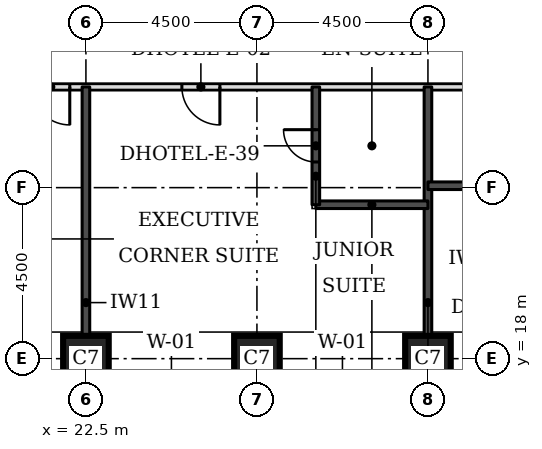
"""IFC4 building model, lengths in metres.
Left out: names, types, materials, properties, quantities, classifications, styles, units other than length and angle.
Written with IfcOpenShell. Run it as: python <this file> out.ifc"""

import sys

from ifc_helpers import new_model, si_unit, direction, frame, frame_2d, origin, origin_2d, place, context, subcontext, project, spatial, rectangle, extrude, element, fill, save


model = new_model("IFC4")
c1 = context("Model", 3, precision=1e-05, world=origin(), true_north=direction((0.0, 1.0)))
c2 = subcontext(c1, "Body", "Model", "MODEL_VIEW")
j1 = project(units=[si_unit("LENGTHUNIT", "METRE"), si_unit("PLANEANGLEUNIT", "RADIAN")], contexts=[c1])
p1 = place(None, origin())
s1 = spatial("IfcSite", under=j1, at=p1, CompositionType="ELEMENT")
p2 = place(p1, origin())
s2 = spatial("IfcBuilding", under=s1, at=p2, CompositionType="ELEMENT")
p3 = place(p2, frame((0.0, 0.0, 39.6)))
s3 = spatial("IfcBuildingStorey", under=s2, at=p3, CompositionType="ELEMENT", Elevation=39.6)
for number, where, z_axis, x_axis in (
    (1, (22.5, 18.0, 0.0), (0.0, 0.0, 1.0), (1.0, 0.0, 0.0)),
    (2, (27.0, 18.0, 0.0), (0.0, 0.0, 1.0), (1.0, 0.0, 0.0)),
    (3, (31.5, 18.0, 0.0), (0.0, 0.0, 1.0), (1.0, 0.0, 0.0)),
):
    element("IfcColumn", number, at=place(p3, frame(where, z_axis=z_axis, x_axis=x_axis)), inside=s3, PredefinedType="COLUMN", context=c2, shape_type="SweptSolid", body=[
        extrude(rectangle(XDim=1.2, YDim=1.2, at=origin_2d()), origin(), (0.0, 0.0, 1.0), 3.3),
    ])
p4 = place(p3, frame((20.65, 25.15, 0.0), z_axis=(0.0, 0.0, 1.0), x_axis=(1.0, 0.0, 0.0)))
e4 = element("IfcWall", 4, at=p4, inside=s3, PredefinedType="PARTITIONING", context=c2, shape_type="SweptSolid", body=[
    extrude(rectangle(XDim=32.2, YDim=0.15, at=frame_2d((16.1, 0.0))), origin(), (0.0, 0.0, 1.0), 3.08),
])
p5 = place(p4, frame((4.375, 0.0, 0.0)))
e5 = element("IfcOpeningElement", 5, at=p5, cuts=e4, PredefinedType="OPENING", context=c2, shape_type="SweptSolid", body=[
    extrude(rectangle(XDim=1.0, YDim=2.1, at=frame_2d((0.5, 1.05))), frame((0.0, 0.085, 0.0), z_axis=(0.0, -1.0, 0.0), x_axis=(1.0, 0.0, 0.0)), (0.0, 0.0, 1.0), 0.17),
])
p6 = place(p4, frame((16.075, 0.0, 0.0)))
e6 = element("IfcOpeningElement", 6, at=p6, cuts=e4, PredefinedType="OPENING", context=c2, shape_type="SweptSolid", body=[
    extrude(rectangle(XDim=1.0, YDim=2.1, at=frame_2d((0.5, 1.05))), frame((0.0, 0.085, 0.0), z_axis=(0.0, -1.0, 0.0), x_axis=(1.0, 0.0, 0.0)), (0.0, 0.0, 1.0), 0.17),
])
p7 = place(p4, frame((22.375, 0.0, 0.0)))
e7 = element("IfcOpeningElement", 7, at=p7, cuts=e4, PredefinedType="OPENING", context=c2, shape_type="SweptSolid", body=[
    extrude(rectangle(XDim=1.0, YDim=2.1, at=frame_2d((0.5, 1.05))), frame((0.0, 0.085, 0.0), z_axis=(0.0, -1.0, 0.0), x_axis=(1.0, 0.0, 0.0)), (0.0, 0.0, 1.0), 0.17),
])
p8 = place(p4, frame((0.425, 0.0, 0.0)))
e8 = element("IfcOpeningElement", 8, at=p8, cuts=e4, PredefinedType="OPENING", context=c2, shape_type="SweptSolid", body=[
    extrude(rectangle(XDim=1.0, YDim=2.1, at=frame_2d((0.5, 1.05))), frame((0.0, 0.085, 0.0), z_axis=(0.0, -1.0, 0.0), x_axis=(1.0, 0.0, 0.0)), (0.0, 0.0, 1.0), 0.17),
])
p9 = place(p4, frame((30.025, 0.0, 0.0)))
e9 = element("IfcOpeningElement", 9, at=p9, cuts=e4, PredefinedType="OPENING", context=c2, shape_type="SweptSolid", body=[
    extrude(rectangle(XDim=1.0, YDim=2.1, at=frame_2d((0.5, 1.05))), frame((0.0, 0.085, 0.0), z_axis=(0.0, -1.0, 0.0), x_axis=(1.0, 0.0, 0.0)), (0.0, 0.0, 1.0), 0.17),
])
for number, where, z_axis, x_axis in (
    (10, (22.5, 18.6, 0.0), (0.0, 0.0, 1.0), (0.0, 1.0, 0.0)),
    (11, (31.5, 18.6, 0.0), (0.0, 0.0, 1.0), (0.0, 1.0, 0.0)),
):
    element("IfcWall", number, at=place(p3, frame(where, z_axis=z_axis, x_axis=x_axis)), inside=s3, PredefinedType="SOLIDWALL", context=c2, shape_type="SweptSolid", body=[
        extrude(rectangle(XDim=6.55, YDim=0.2, at=frame_2d((3.275, 0.0))), origin(), (0.0, 0.0, 1.0), 3.08),
    ])
p10 = place(p3, frame((28.55, 22.05, 0.0), z_axis=(0.0, 0.0, 1.0), x_axis=(1.0, 0.0, 0.0)))
e12 = element("IfcWall", 12, at=p10, inside=s3, PredefinedType="SOLIDWALL", context=c2, shape_type="SweptSolid", body=[
    extrude(rectangle(XDim=2.95, YDim=0.2, at=frame_2d((1.475, 0.0))), origin(), (0.0, 0.0, 1.0), 3.08),
])
p11 = place(p3, frame((28.55, 22.05, 0.0), z_axis=(0.0, 0.0, 1.0), x_axis=(0.0, 1.0, 0.0)))
e13 = element("IfcWall", 13, at=p11, inside=s3, PredefinedType="SOLIDWALL", context=c2, shape_type="SweptSolid", body=[
    extrude(rectangle(XDim=3.1, YDim=0.2, at=frame_2d((1.55, 0.0))), origin(), (0.0, 0.0, 1.0), 3.08),
])
p12 = place(p11, frame((1.125, 0.0, 0.0)))
e14 = element("IfcOpeningElement", 14, at=p12, cuts=e13, PredefinedType="OPENING", context=c2, shape_type="SweptSolid", body=[
    extrude(rectangle(XDim=0.85, YDim=2.1, at=frame_2d((0.425, 1.05))), frame((0.0, 0.11, 0.0), z_axis=(0.0, -1.0, 0.0), x_axis=(1.0, 0.0, 0.0)), (0.0, 0.0, 1.0), 0.22),
])
p13 = place(p3, frame((31.5, 22.55, 0.0), z_axis=(0.0, 0.0, 1.0), x_axis=(1.0, 0.0, 0.0)))
e15 = element("IfcWall", 15, at=p13, inside=s3, PredefinedType="SOLIDWALL", context=c2, shape_type="SweptSolid", body=[
    extrude(rectangle(XDim=2.45, YDim=0.2, at=frame_2d((1.225, 0.0))), origin(), (0.0, 0.0, 1.0), 3.08),
])
p14 = place(p5, frame((1.0, 0.0, 0.0), z_axis=(0.0, 0.0, 1.0), x_axis=(-1.0, 0.0, 0.0)))
e16 = element("IfcDoor", 16, at=p14, inside=s3, OperationType="SINGLE_SWING_LEFT", PredefinedType="DOOR", context=c2, shape_type="SweptSolid", body=[
    extrude(rectangle(XDim=1.0, YDim=2.1, at=frame_2d((0.5, 1.05))), frame((0.0, 0.025, 0.0), z_axis=(0.0, -1.0, 0.0), x_axis=(1.0, 0.0, 0.0)), (0.0, 0.0, 1.0), 0.05),
])
fill(e5, e16)
p15 = place(p12, origin())
e17 = element("IfcDoor", 17, at=p15, inside=s3, OperationType="SINGLE_SWING_RIGHT", PredefinedType="DOOR", context=c2, shape_type="SweptSolid", body=[
    extrude(rectangle(XDim=0.85, YDim=2.1, at=frame_2d((0.425, 1.05))), frame((0.0, 0.025, 0.0), z_axis=(0.0, -1.0, 0.0), x_axis=(1.0, 0.0, 0.0)), (0.0, 0.0, 1.0), 0.05),
])
fill(e14, e17)
p16 = place(p8, frame((1.0, 0.0, 0.0), z_axis=(0.0, 0.0, 1.0), x_axis=(-1.0, 0.0, 0.0)))
e18 = element("IfcDoor", 18, at=p16, inside=s3, OperationType="SINGLE_SWING_LEFT", PredefinedType="DOOR", context=c2, shape_type="SweptSolid", body=[
    extrude(rectangle(XDim=1.0, YDim=2.1, at=frame_2d((0.5, 1.05))), frame((0.0, 0.025, 0.0), z_axis=(0.0, -1.0, 0.0), x_axis=(1.0, 0.0, 0.0)), (0.0, 0.0, 1.0), 0.05),
])
fill(e8, e18)
save(model, sys.argv[1])
